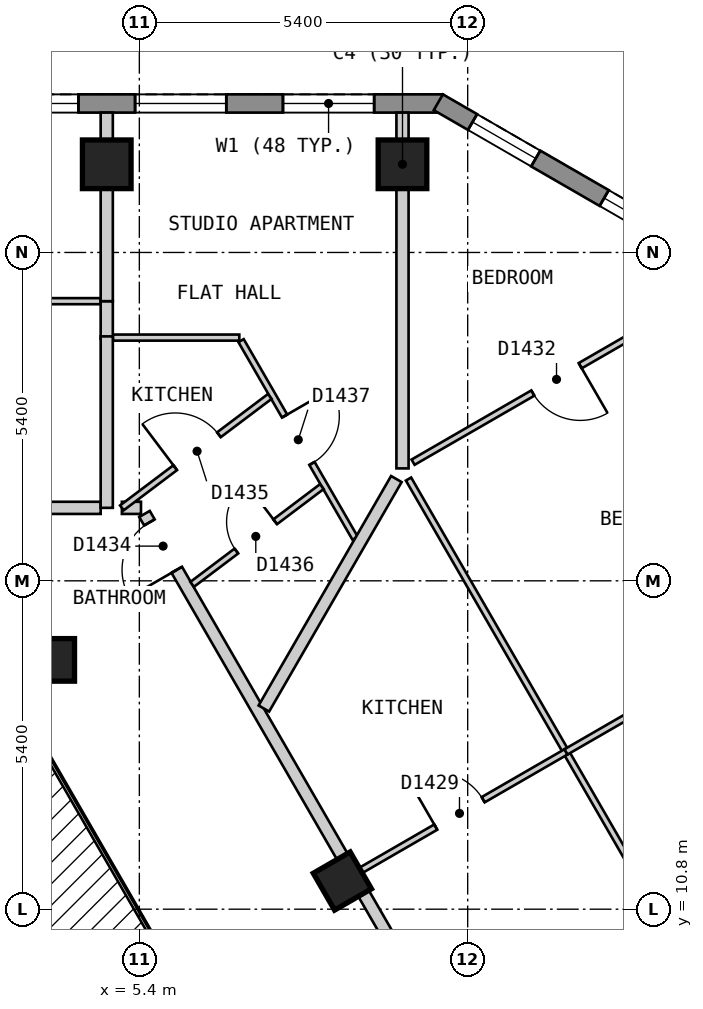
"""IFC4 building model, lengths in metres.
Left out: names, types, materials, properties, quantities, classifications, styles, units other than length and angle.
Written with IfcOpenShell. Run it as: python <this file> out.ifc"""

import sys

from ifc_helpers import new_model, si_unit, direction, frame, frame_2d, origin, origin_2d, place, context, subcontext, project, spatial, polyline, rectangle, outline, extrude, element, fill, save


model = new_model("IFC4")
c1 = context("Model", 3, precision=1e-05, world=origin(), true_north=direction((0.0, 1.0)))
c2 = subcontext(c1, "Body", "Model", "MODEL_VIEW")
j1 = project(units=[si_unit("LENGTHUNIT", "METRE"), si_unit("PLANEANGLEUNIT", "RADIAN")], contexts=[c1])
p1 = place(None, origin())
s1 = spatial("IfcSite", under=j1, at=p1, CompositionType="ELEMENT")
p2 = place(p1, origin())
s2 = spatial("IfcBuilding", under=s1, at=p2, CompositionType="ELEMENT")
p3 = place(p2, frame((0.0, 0.0, 178.2)))
s3 = spatial("IfcBuildingStorey", under=s2, at=p3, CompositionType="ELEMENT", Elevation=178.2)
for number, where, z_axis, x_axis in (
    (1, (9.728, 23.05, 0.0), (0.0, 0.0, 1.0), (-1.0, 0.0, 0.0)),
    (2, (4.864, 23.05, 0.0), (0.0, 0.0, 1.0), (-1.0, 0.0, 0.0)),
):
    element("IfcColumn", number, at=place(p3, frame(where, z_axis=z_axis, x_axis=x_axis)), inside=s3, PredefinedType="COLUMN", context=c2, shape_type="SweptSolid", body=[
        extrude(rectangle(XDim=0.8, YDim=0.8, at=origin_2d()), origin(), (0.0, 0.0, 1.0), 3.0),
    ])
for number, where, z_axis, x_axis in (
    (3, (8.739, 11.263, 0.0), (0.0, 0.0, 1.0), (-0.5, 0.866, 0.0)),
    (4, (3.984, 14.9, 0.0), (0.0, 0.0, 1.0), (1.0, 0.0, 0.0)),
):
    element("IfcColumn", number, at=place(p3, frame(where, z_axis=z_axis, x_axis=x_axis)), inside=s3, PredefinedType="COLUMN", context=c2, shape_type="SweptSolid", body=[
        extrude(rectangle(XDim=0.7, YDim=0.7, at=origin_2d()), origin(), (0.0, 0.0, 1.0), 3.0),
    ])
p4 = place(p3, frame((10.392, 24.05, 0.0), z_axis=(0.0, 0.0, 1.0), x_axis=(-1.0, 0.0, 0.0)))
e5 = element("IfcWall", 5, at=p4, inside=s3, PredefinedType="SOLIDWALL", context=c2, shape_type="SweptSolid", body=[
    extrude(outline(polyline([(0.0, -0.15), (20.784, -0.15), (20.704, 0.15), (0.08, 0.15), (0.0, -0.15)])), origin(), (0.0, 0.0, 1.0), 2.7),
])
p5 = place(p4, frame((1.13, 0.0, 0.15)))
e6 = element("IfcOpeningElement", 6, at=p5, cuts=e5, PredefinedType="OPENING", context=c2, shape_type="SweptSolid", body=[
    extrude(rectangle(XDim=1.5, YDim=2.1, at=frame_2d((0.75, 1.05))), frame((0.0, 0.16, 0.0), z_axis=(0.0, -1.0, 0.0), x_axis=(1.0, 0.0, 0.0)), (0.0, 0.0, 1.0), 0.32),
])
p6 = place(p4, frame((3.562, 0.0, 0.15)))
e7 = element("IfcOpeningElement", 7, at=p6, cuts=e5, PredefinedType="OPENING", context=c2, shape_type="SweptSolid", body=[
    extrude(rectangle(XDim=1.5, YDim=2.1, at=frame_2d((0.75, 1.05))), frame((0.0, 0.16, 0.0), z_axis=(0.0, -1.0, 0.0), x_axis=(1.0, 0.0, 0.0)), (0.0, 0.0, 1.0), 0.32),
])
p7 = place(p4, frame((5.994, 0.0, 0.15)))
e8 = element("IfcOpeningElement", 8, at=p7, cuts=e5, PredefinedType="OPENING", context=c2, shape_type="SweptSolid", body=[
    extrude(rectangle(XDim=1.5, YDim=2.1, at=frame_2d((0.75, 1.05))), frame((0.0, 0.16, 0.0), z_axis=(0.0, -1.0, 0.0), x_axis=(1.0, 0.0, 0.0)), (0.0, 0.0, 1.0), 0.32),
])
p8 = place(p4, frame((8.426, 0.0, 0.15)))
e9 = element("IfcOpeningElement", 9, at=p8, cuts=e5, PredefinedType="OPENING", context=c2, shape_type="SweptSolid", body=[
    extrude(rectangle(XDim=1.5, YDim=2.1, at=frame_2d((0.75, 1.05))), frame((0.0, 0.16, 0.0), z_axis=(0.0, -1.0, 0.0), x_axis=(1.0, 0.0, 0.0)), (0.0, 0.0, 1.0), 0.32),
])
p9 = place(p4, frame((10.858, 0.0, 0.15)))
e10 = element("IfcOpeningElement", 10, at=p9, cuts=e5, PredefinedType="OPENING", context=c2, shape_type="SweptSolid", body=[
    extrude(rectangle(XDim=1.5, YDim=2.1, at=frame_2d((0.75, 1.05))), frame((0.0, 0.16, 0.0), z_axis=(0.0, -1.0, 0.0), x_axis=(1.0, 0.0, 0.0)), (0.0, 0.0, 1.0), 0.32),
])
p10 = place(p4, frame((13.29, 0.0, 0.15)))
e11 = element("IfcOpeningElement", 11, at=p10, cuts=e5, PredefinedType="OPENING", context=c2, shape_type="SweptSolid", body=[
    extrude(rectangle(XDim=1.5, YDim=2.1, at=frame_2d((0.75, 1.05))), frame((0.0, 0.16, 0.0), z_axis=(0.0, -1.0, 0.0), x_axis=(1.0, 0.0, 0.0)), (0.0, 0.0, 1.0), 0.32),
])
p11 = place(p4, frame((15.722, 0.0, 0.15)))
e12 = element("IfcOpeningElement", 12, at=p11, cuts=e5, PredefinedType="OPENING", context=c2, shape_type="SweptSolid", body=[
    extrude(rectangle(XDim=1.5, YDim=2.1, at=frame_2d((0.75, 1.05))), frame((0.0, 0.16, 0.0), z_axis=(0.0, -1.0, 0.0), x_axis=(1.0, 0.0, 0.0)), (0.0, 0.0, 1.0), 0.32),
])
p12 = place(p4, frame((18.154, 0.0, 0.15)))
e13 = element("IfcOpeningElement", 13, at=p12, cuts=e5, PredefinedType="OPENING", context=c2, shape_type="SweptSolid", body=[
    extrude(rectangle(XDim=1.5, YDim=2.1, at=frame_2d((0.75, 1.05))), frame((0.0, 0.16, 0.0), z_axis=(0.0, -1.0, 0.0), x_axis=(1.0, 0.0, 0.0)), (0.0, 0.0, 1.0), 0.32),
])
p13 = place(p3, frame((14.647, 21.57, 0.0), z_axis=(0.0, 0.0, 1.0), x_axis=(-0.866022959057, 0.500004234368, 0.0)))
e14 = element("IfcWall", 14, at=p13, inside=s3, PredefinedType="SOLIDWALL", context=c2, shape_type="SweptSolid", body=[
    extrude(outline(polyline([(0.0, -0.15), (5.0, -0.15), (4.92, 0.15), (0.08, 0.15), (0.0, -0.15)])), origin(), (0.0, 0.0, 1.0), 2.7),
])
p14 = place(p13, frame((0.65, 0.0, 0.15)))
e15 = element("IfcOpeningElement", 15, at=p14, cuts=e14, PredefinedType="OPENING", context=c2, shape_type="SweptSolid", body=[
    extrude(rectangle(XDim=1.2, YDim=2.1, at=frame_2d((0.6, 1.05))), frame((0.0, 0.16, 0.0), z_axis=(0.0, -1.0, 0.0), x_axis=(1.0, 0.0, 0.0)), (0.0, 0.0, 1.0), 0.32),
])
p15 = place(p13, frame((3.15, 0.0, 0.15)))
e16 = element("IfcOpeningElement", 16, at=p15, cuts=e14, PredefinedType="OPENING", context=c2, shape_type="SweptSolid", body=[
    extrude(rectangle(XDim=1.2, YDim=2.1, at=frame_2d((0.6, 1.05))), frame((0.0, 0.16, 0.0), z_axis=(0.0, -1.0, 0.0), x_axis=(1.0, 0.0, 0.0)), (0.0, 0.0, 1.0), 0.32),
])
p16 = place(p3, frame((5.485, 17.3, 0.0), z_axis=(0.0, 0.0, 1.0), x_axis=(0.499965832213, -0.866045129667, 0.0)))
e17 = element("IfcWall", 17, at=p16, inside=s3, PredefinedType="PARTITIONING", context=c2, shape_type="SweptSolid", body=[
    extrude(rectangle(XDim=10.739, YDim=0.2, at=frame_2d((5.369, 0.0))), origin(), (0.0, 0.0, 1.0), 2.7),
])
p17 = place(p16, frame((9.048, 0.0, 0.0)))
e18 = element("IfcOpeningElement", 18, at=p17, cuts=e17, PredefinedType="OPENING", context=c2, shape_type="SweptSolid", body=[
    extrude(rectangle(XDim=1.0, YDim=2.1, at=frame_2d((0.5, 1.05))), frame((0.0, 0.11, 0.0), z_axis=(0.0, -1.0, 0.0), x_axis=(1.0, 0.0, 0.0)), (0.0, 0.0, 1.0), 0.22),
])
p18 = place(p16, frame((0.161, 0.0, 0.0)))
e19 = element("IfcOpeningElement", 19, at=p18, cuts=e17, PredefinedType="OPENING", context=c2, shape_type="SweptSolid", body=[
    extrude(rectangle(XDim=0.9, YDim=2.1, at=frame_2d((0.45, 1.05))), frame((0.0, 0.11, 0.0), z_axis=(0.0, -1.0, 0.0), x_axis=(1.0, 0.0, 0.0)), (0.0, 0.0, 1.0), 0.22),
])
p19 = place(p3, frame((-5.311, 17.4, 0.0), z_axis=(0.0, 0.0, 1.0), x_axis=(1.0, 0.0, 0.0)))
e20 = element("IfcWall", 20, at=p19, inside=s3, PredefinedType="PARTITIONING", context=c2, shape_type="SweptSolid", body=[
    extrude(rectangle(XDim=10.075, YDim=0.2, at=frame_2d((5.038, 0.0))), origin(), (0.0, 0.0, 1.0), 2.7),
])
p20 = place(p19, frame((2.429, 0.0, 0.0)))
e21 = element("IfcOpeningElement", 21, at=p20, cuts=e20, PredefinedType="OPENING", context=c2, shape_type="SweptSolid", body=[
    extrude(rectangle(XDim=0.9, YDim=2.1, at=frame_2d((0.45, 1.05))), frame((0.0, 0.11, 0.0), z_axis=(0.0, -1.0, 0.0), x_axis=(1.0, 0.0, 0.0)), (0.0, 0.0, 1.0), 0.22),
])
p21 = place(p3, frame((5.113, 17.4, 0.0), z_axis=(0.0, 0.0, 1.0), x_axis=(1.0, 0.0, 0.0)))
e22 = element("IfcWall", 22, at=p21, inside=s3, PredefinedType="PARTITIONING", context=c2, shape_type="SweptSolid", body=[
    extrude(rectangle(XDim=0.314, YDim=0.2, at=frame_2d((0.157, 0.0))), origin(), (0.0, 0.0, 1.0), 2.7),
])
p22 = place(p3, frame((7.073, 20.15, 0.0), z_axis=(0.0, 0.0, 1.0), x_axis=(0.499917691695, -0.866072919292, 0.0)))
e23 = element("IfcWall", 23, at=p22, inside=s3, PredefinedType="PARTITIONING", context=c2, shape_type="SweptSolid", body=[
    extrude(rectangle(XDim=3.753, YDim=0.1, at=frame_2d((1.876, 0.0))), origin(), (0.0, 0.0, 1.0), 2.7),
])
p23 = place(p22, frame((1.432, 0.0, 0.0)))
e24 = element("IfcOpeningElement", 24, at=p23, cuts=e23, PredefinedType="OPENING", context=c2, shape_type="SweptSolid", body=[
    extrude(rectangle(XDim=0.9, YDim=2.1, at=frame_2d((0.45, 1.05))), frame((0.0, 0.06, 0.0), z_axis=(0.0, -1.0, 0.0), x_axis=(1.0, 0.0, 0.0)), (0.0, 0.0, 1.0), 0.12),
])
p24 = place(p3, frame((9.827, 17.874, 0.0), z_axis=(0.0, 0.0, 1.0), x_axis=(0.499962189394, -0.866047232647, 0.0)))
e25 = element("IfcWall", 25, at=p24, inside=s3, PredefinedType="PARTITIONING", context=c2, shape_type="SweptSolid", body=[
    extrude(rectangle(XDim=11.401, YDim=0.1, at=frame_2d((5.701, 0.0))), origin(), (0.0, 0.0, 1.0), 2.7),
])
p25 = place(p24, frame((7.433, 0.0, 0.0)))
e26 = element("IfcOpeningElement", 26, at=p25, cuts=e25, PredefinedType="OPENING", context=c2, shape_type="SweptSolid", body=[
    extrude(rectangle(XDim=0.9, YDim=2.1, at=frame_2d((0.45, 1.05))), frame((0.0, 0.06, 0.0), z_axis=(0.0, -1.0, 0.0), x_axis=(1.0, 0.0, 0.0)), (0.0, 0.0, 1.0), 0.12),
])
p26 = place(p3, frame((4.964, 20.2, 0.0), z_axis=(0.0, 0.0, 1.0), x_axis=(1.0, 0.0, 0.0)))
e27 = element("IfcWall", 27, at=p26, inside=s3, PredefinedType="PARTITIONING", context=c2, shape_type="SweptSolid", body=[
    extrude(rectangle(XDim=2.08, YDim=0.1, at=frame_2d((1.04, 0.0))), origin(), (0.0, 0.0, 1.0), 2.7),
])
p27 = place(p3, frame((0.05, 20.799, 0.0), z_axis=(0.0, 0.0, 1.0), x_axis=(1.0, 0.0, 0.0)))
e28 = element("IfcWall", 28, at=p27, inside=s3, PredefinedType="PARTITIONING", context=c2, shape_type="SweptSolid", body=[
    extrude(rectangle(XDim=4.714, YDim=0.1, at=frame_2d((2.357, 0.0))), origin(), (0.0, 0.0, 1.0), 2.7),
])
p28 = place(p27, frame((1.982, 0.0, 0.0)))
e29 = element("IfcOpeningElement", 29, at=p28, cuts=e28, PredefinedType="OPENING", context=c2, shape_type="SweptSolid", body=[
    extrude(rectangle(XDim=0.8, YDim=2.1, at=frame_2d((0.4, 1.05))), frame((0.0, 0.06, 0.0), z_axis=(0.0, -1.0, 0.0), x_axis=(1.0, 0.0, 0.0)), (0.0, 0.0, 1.0), 0.12),
])
p29 = place(p3, frame((8.999, 11.413, 0.0), z_axis=(0.0, 0.0, 1.0), x_axis=(0.865969252911, 0.500097243556, 0.0)))
e30 = element("IfcWall", 30, at=p29, inside=s3, PredefinedType="PARTITIONING", context=c2, shape_type="SweptSolid", body=[
    extrude(rectangle(XDim=3.947, YDim=0.1, at=frame_2d((1.974, 0.0))), origin(), (0.0, 0.0, 1.0), 2.7),
])
p30 = place(p29, frame((1.474, 0.0, 0.0)))
e31 = element("IfcOpeningElement", 31, at=p30, cuts=e30, PredefinedType="OPENING", context=c2, shape_type="SweptSolid", body=[
    extrude(rectangle(XDim=0.9, YDim=2.1, at=frame_2d((0.45, 1.05))), frame((0.0, 0.06, 0.0), z_axis=(0.0, -1.0, 0.0), x_axis=(1.0, 0.0, 0.0)), (0.0, 0.0, 1.0), 0.12),
])
p31 = place(p3, frame((9.902, 18.151, 0.0), z_axis=(0.0, 0.0, 1.0), x_axis=(0.866032278734, 0.499988092049, 0.0)))
e32 = element("IfcWall", 32, at=p31, inside=s3, PredefinedType="PARTITIONING", context=c2, shape_type="SweptSolid", body=[
    extrude(rectangle(XDim=5.649, YDim=0.1, at=frame_2d((2.824, 0.0))), origin(), (0.0, 0.0, 1.0), 2.7),
])
p32 = place(p31, frame((2.274, 0.0, 0.0)))
e33 = element("IfcOpeningElement", 33, at=p32, cuts=e32, PredefinedType="OPENING", context=c2, shape_type="SweptSolid", body=[
    extrude(rectangle(XDim=0.9, YDim=2.1, at=frame_2d((0.45, 1.05))), frame((0.0, 0.06, 0.0), z_axis=(0.0, -1.0, 0.0), x_axis=(1.0, 0.0, 0.0)), (0.0, 0.0, 1.0), 0.12),
])
p33 = place(p3, frame((6.269, 16.142, 0.0), z_axis=(0.0, 0.0, 1.0), x_axis=(0.798549086509, 0.601929693931, 0.0)))
e34 = element("IfcWall", 34, at=p33, inside=s3, PredefinedType="PARTITIONING", context=c2, shape_type="SweptSolid", body=[
    extrude(rectangle(XDim=2.67, YDim=0.1, at=frame_2d((1.335, 0.0))), origin(), (0.0, 0.0, 1.0), 2.7),
])
p34 = place(p33, frame((0.91, 0.0, 0.0)))
e35 = element("IfcOpeningElement", 35, at=p34, cuts=e34, PredefinedType="OPENING", context=c2, shape_type="SweptSolid", body=[
    extrude(rectangle(XDim=0.8, YDim=2.1, at=frame_2d((0.4, 1.05))), frame((0.0, 0.06, 0.0), z_axis=(0.0, -1.0, 0.0), x_axis=(1.0, 0.0, 0.0)), (0.0, 0.0, 1.0), 0.12),
])
p35 = place(p3, frame((5.113, 17.4, 0.0), z_axis=(0.0, 0.0, 1.0), x_axis=(0.798718434647, 0.601704962714, 0.0)))
e36 = element("IfcWall", 36, at=p35, inside=s3, PredefinedType="PARTITIONING", context=c2, shape_type="SweptSolid", body=[
    extrude(rectangle(XDim=3.045, YDim=0.1, at=frame_2d((1.522, 0.0))), origin(), (0.0, 0.0, 1.0), 2.7),
])
p36 = place(p35, frame((1.098, 0.0, 0.0)))
e37 = element("IfcOpeningElement", 37, at=p36, cuts=e36, PredefinedType="OPENING", context=c2, shape_type="SweptSolid", body=[
    extrude(rectangle(XDim=0.9, YDim=2.1, at=frame_2d((0.45, 1.05))), frame((0.0, 0.06, 0.0), z_axis=(0.0, -1.0, 0.0), x_axis=(1.0, 0.0, 0.0)), (0.0, 0.0, 1.0), 0.12),
])
p37 = place(p3, frame((4.864, 20.799, 0.0), z_axis=(0.0, 0.0, 1.0), x_axis=(0.0, -1.0, 0.0)))
e38 = element("IfcWall", 38, at=p37, inside=s3, PredefinedType="PARTITIONING", context=c2, shape_type="SweptSolid", body=[
    extrude(rectangle(XDim=0.619, YDim=0.2, at=frame_2d((0.31, 0.0))), origin(), (0.0, 0.0, 1.0), 2.7),
])
p38 = place(p3, frame((7.448, 14.1, 0.0), z_axis=(0.0, 0.0, 1.0), x_axis=(0.500013426303, 0.866017651966, 0.0)))
e39 = element("IfcWall", 39, at=p38, inside=s3, PredefinedType="PARTITIONING", context=c2, shape_type="SweptSolid", body=[
    extrude(rectangle(XDim=4.358, YDim=0.2, at=frame_2d((2.179, 0.0))), origin(), (0.0, 0.0, 1.0), 2.7),
])
p39 = place(p3, frame((4.864, 17.4, 0.0), z_axis=(0.0, 0.0, 1.0), x_axis=(0.0, 1.0, 0.0)))
e40 = element("IfcWall", 40, at=p39, inside=s3, PredefinedType="PARTITIONING", context=c2, shape_type="SweptSolid", body=[
    extrude(rectangle(XDim=2.82, YDim=0.2, at=frame_2d((1.41, 0.0))), origin(), (0.0, 0.0, 1.0), 2.7),
])
p40 = place(p3, frame((4.864, 20.799, 0.0), z_axis=(0.0, 0.0, 1.0), x_axis=(0.0, 1.0, 0.0)))
e41 = element("IfcWall", 41, at=p40, inside=s3, PredefinedType="PARTITIONING", context=c2, shape_type="SweptSolid", body=[
    extrude(rectangle(XDim=3.101, YDim=0.2, at=frame_2d((1.55, 0.0))), origin(), (0.0, 0.0, 1.0), 2.7),
])
p41 = place(p3, frame((9.728, 18.049, 0.0), z_axis=(0.0, 0.0, 1.0), x_axis=(0.0, 1.0, 0.0)))
e42 = element("IfcWall", 42, at=p41, inside=s3, PredefinedType="PARTITIONING", context=c2, shape_type="SweptSolid", body=[
    extrude(rectangle(XDim=5.851, YDim=0.2, at=frame_2d((2.925, 0.0))), origin(), (0.0, 0.0, 1.0), 2.7),
])
p42 = place(p3, frame((12.417, 13.387, 0.0), z_axis=(0.0, 0.0, 1.0), x_axis=(0.866070981966, 0.499921047963, 0.0)))
e43 = element("IfcWall", 43, at=p42, inside=s3, PredefinedType="PARTITIONING", context=c2, shape_type="SweptSolid", body=[
    extrude(rectangle(XDim=5.853, YDim=0.1, at=frame_2d((2.927, 0.0))), origin(), (0.0, 0.0, 1.0), 2.7),
])
p43 = place(p42, frame((2.476, 0.0, 0.0)))
e44 = element("IfcOpeningElement", 44, at=p43, cuts=e43, PredefinedType="OPENING", context=c2, shape_type="SweptSolid", body=[
    extrude(rectangle(XDim=0.9, YDim=2.1, at=frame_2d((0.45, 1.05))), frame((0.0, 0.06, 0.0), z_axis=(0.0, -1.0, 0.0), x_axis=(1.0, 0.0, 0.0)), (0.0, 0.0, 1.0), 0.12),
])
p44 = place(p5, origin())
e45 = element("IfcWindow", 45, at=p44, inside=s3, PartitioningType="SINGLE_PANEL", PredefinedType="WINDOW", context=c2, shape_type="SweptSolid", body=[
    extrude(rectangle(XDim=1.5, YDim=2.1, at=frame_2d((0.75, 1.05))), frame((0.0, 0.03, 0.0), z_axis=(0.0, -1.0, 0.0), x_axis=(1.0, 0.0, 0.0)), (0.0, 0.0, 1.0), 0.06),
])
fill(e6, e45)
p45 = place(p6, origin())
e46 = element("IfcWindow", 46, at=p45, inside=s3, PartitioningType="SINGLE_PANEL", PredefinedType="WINDOW", context=c2, shape_type="SweptSolid", body=[
    extrude(rectangle(XDim=1.5, YDim=2.1, at=frame_2d((0.75, 1.05))), frame((0.0, 0.03, 0.0), z_axis=(0.0, -1.0, 0.0), x_axis=(1.0, 0.0, 0.0)), (0.0, 0.0, 1.0), 0.06),
])
fill(e7, e46)
p46 = place(p7, origin())
e47 = element("IfcWindow", 47, at=p46, inside=s3, PartitioningType="SINGLE_PANEL", PredefinedType="WINDOW", context=c2, shape_type="SweptSolid", body=[
    extrude(rectangle(XDim=1.5, YDim=2.1, at=frame_2d((0.75, 1.05))), frame((0.0, 0.03, 0.0), z_axis=(0.0, -1.0, 0.0), x_axis=(1.0, 0.0, 0.0)), (0.0, 0.0, 1.0), 0.06),
])
fill(e8, e47)
p47 = place(p14, origin())
e48 = element("IfcWindow", 48, at=p47, inside=s3, PartitioningType="SINGLE_PANEL", PredefinedType="WINDOW", context=c2, shape_type="SweptSolid", body=[
    extrude(rectangle(XDim=1.2, YDim=2.1, at=frame_2d((0.6, 1.05))), frame((0.0, 0.03, 0.0), z_axis=(0.0, -1.0, 0.0), x_axis=(1.0, 0.0, 0.0)), (0.0, 0.0, 1.0), 0.06),
])
fill(e15, e48)
p48 = place(p15, origin())
e49 = element("IfcWindow", 49, at=p48, inside=s3, PartitioningType="SINGLE_PANEL", PredefinedType="WINDOW", context=c2, shape_type="SweptSolid", body=[
    extrude(rectangle(XDim=1.2, YDim=2.1, at=frame_2d((0.6, 1.05))), frame((0.0, 0.03, 0.0), z_axis=(0.0, -1.0, 0.0), x_axis=(1.0, 0.0, 0.0)), (0.0, 0.0, 1.0), 0.06),
])
fill(e16, e49)
p49 = place(p30, origin())
e50 = element("IfcDoor", 50, at=p49, inside=s3, OperationType="SINGLE_SWING_LEFT", PredefinedType="DOOR", context=c2, shape_type="SweptSolid", body=[
    extrude(rectangle(XDim=0.9, YDim=2.1, at=frame_2d((0.45, 1.05))), frame((0.0, 0.025, 0.0), z_axis=(0.0, -1.0, 0.0), x_axis=(1.0, 0.0, 0.0)), (0.0, 0.0, 1.0), 0.05),
])
fill(e31, e50)
p50 = place(p32, origin())
e51 = element("IfcDoor", 51, at=p50, inside=s3, OperationType="SINGLE_SWING_RIGHT", PredefinedType="DOOR", context=c2, shape_type="SweptSolid", body=[
    extrude(rectangle(XDim=0.9, YDim=2.1, at=frame_2d((0.45, 1.05))), frame((0.0, 0.025, 0.0), z_axis=(0.0, -1.0, 0.0), x_axis=(1.0, 0.0, 0.0)), (0.0, 0.0, 1.0), 0.05),
])
fill(e33, e51)
p51 = place(p18, origin())
e52 = element("IfcDoor", 52, at=p51, inside=s3, OperationType="SINGLE_SWING_RIGHT", PredefinedType="DOOR", context=c2, shape_type="SweptSolid", body=[
    extrude(rectangle(XDim=0.9, YDim=2.1, at=frame_2d((0.45, 1.05))), frame((0.0, 0.025, 0.0), z_axis=(0.0, -1.0, 0.0), x_axis=(1.0, 0.0, 0.0)), (0.0, 0.0, 1.0), 0.05),
])
fill(e19, e52)
p52 = place(p36, origin())
e53 = element("IfcDoor", 53, at=p52, inside=s3, OperationType="SINGLE_SWING_LEFT", PredefinedType="DOOR", context=c2, shape_type="SweptSolid", body=[
    extrude(rectangle(XDim=0.9, YDim=2.1, at=frame_2d((0.45, 1.05))), frame((0.0, 0.025, 0.0), z_axis=(0.0, -1.0, 0.0), x_axis=(1.0, 0.0, 0.0)), (0.0, 0.0, 1.0), 0.05),
])
fill(e37, e53)
p53 = place(p34, origin())
e54 = element("IfcDoor", 54, at=p53, inside=s3, OperationType="SINGLE_SWING_RIGHT", PredefinedType="DOOR", context=c2, shape_type="SweptSolid", body=[
    extrude(rectangle(XDim=0.8, YDim=2.1, at=frame_2d((0.4, 1.05))), frame((0.0, 0.025, 0.0), z_axis=(0.0, -1.0, 0.0), x_axis=(1.0, 0.0, 0.0)), (0.0, 0.0, 1.0), 0.05),
])
fill(e35, e54)
p54 = place(p23, origin())
e55 = element("IfcDoor", 55, at=p54, inside=s3, OperationType="SINGLE_SWING_LEFT", PredefinedType="DOOR", context=c2, shape_type="SweptSolid", body=[
    extrude(rectangle(XDim=0.9, YDim=2.1, at=frame_2d((0.45, 1.05))), frame((0.0, 0.025, 0.0), z_axis=(0.0, -1.0, 0.0), x_axis=(1.0, 0.0, 0.0)), (0.0, 0.0, 1.0), 0.05),
])
fill(e24, e55)
save(model, sys.argv[1])
